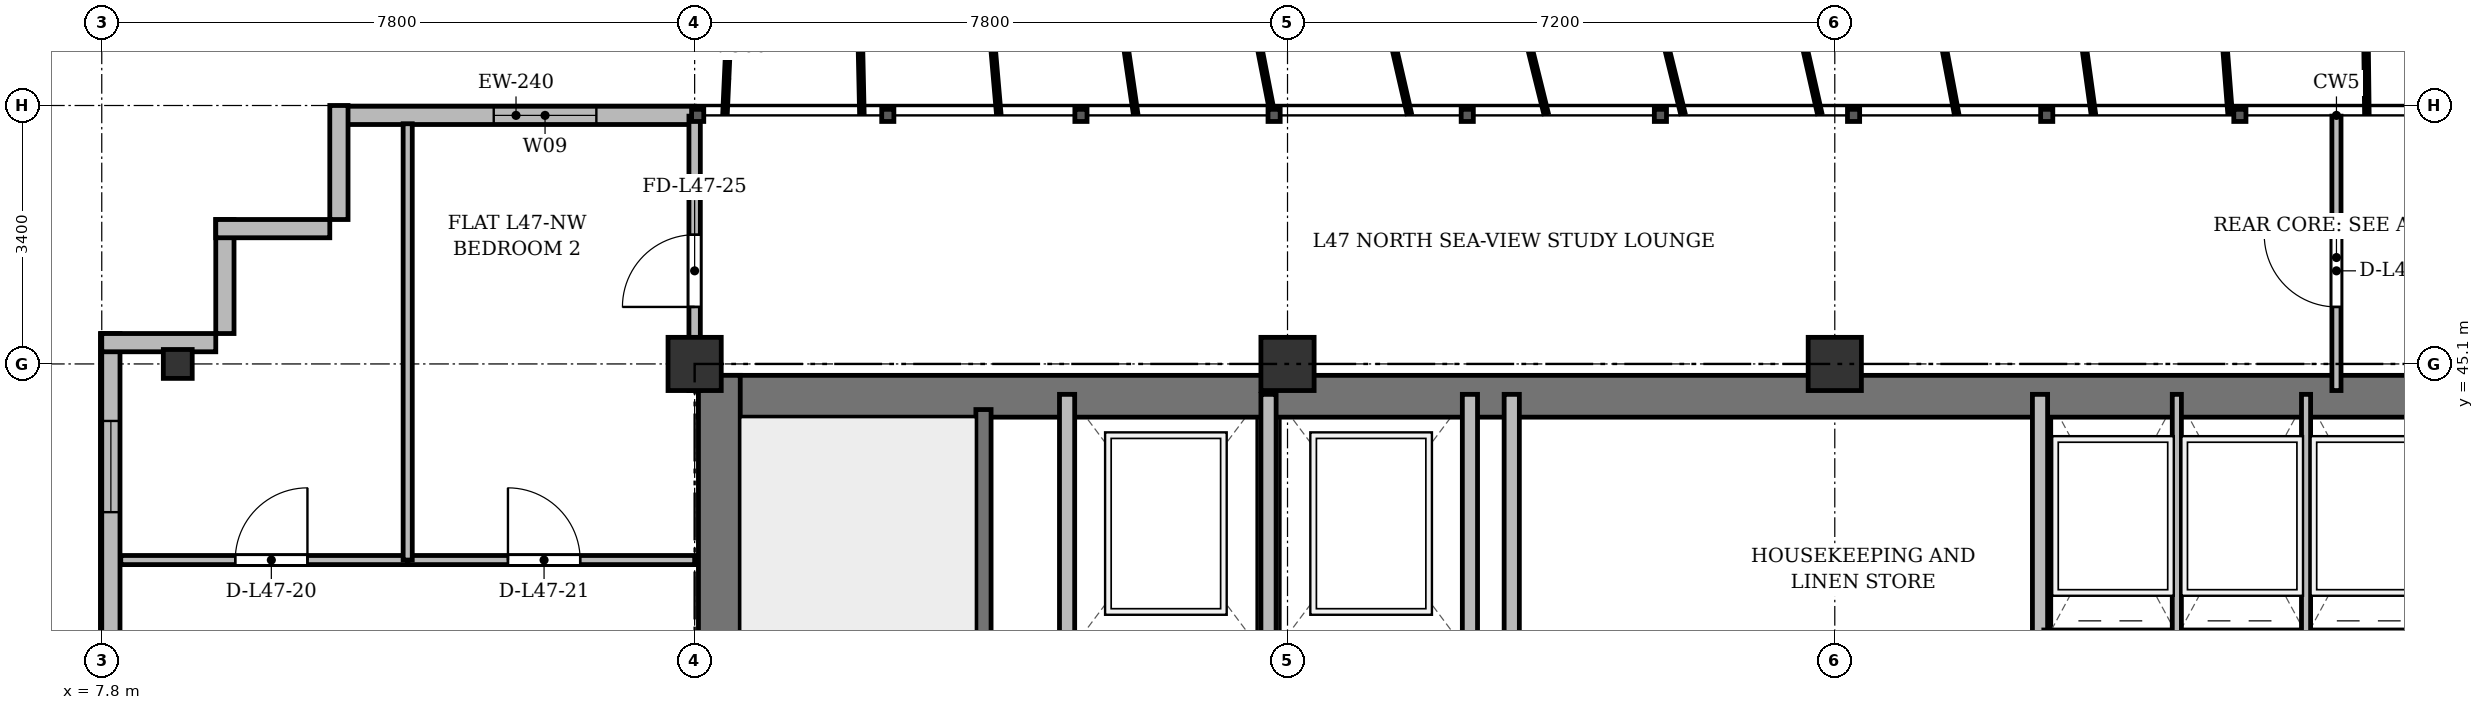
"""IFC4 building model, lengths in metres.
Left out: names, types, materials, properties, quantities, classifications, styles, units other than length and angle.
Written with IfcOpenShell. Run it as: python <this file> out.ifc"""

import sys

from ifc_helpers import new_model, si_unit, direction, frame, frame_2d, origin, origin_2d, place, context, subcontext, project, spatial, rectangle, i_section, extrude, source, transform, mapped, element, fill, save


model = new_model("IFC4")
c1 = context("Model", 3, precision=1e-05, world=origin(), true_north=direction((0.0, 1.0)))
c2 = subcontext(c1, "Body", "Model", "MODEL_VIEW")
j1 = project(units=[si_unit("LENGTHUNIT", "METRE"), si_unit("PLANEANGLEUNIT", "RADIAN")], contexts=[c1])
p1 = place(None, origin())
s1 = spatial("IfcSite", under=j1, at=p1, CompositionType="ELEMENT")
p2 = place(p1, origin())
s2 = spatial("IfcBuilding", under=s1, at=p2, CompositionType="ELEMENT")
p3 = place(p2, frame((0.0, 0.0, 178.9)))
s3 = spatial("IfcBuildingStorey", under=s2, at=p3, CompositionType="ELEMENT", Elevation=178.9)
m1 = source(origin(), c2, "Body", "SweptSolid", [
    extrude(i_section(OverallWidth=0.38, OverallDepth=0.38, WebThickness=0.02, FlangeThickness=0.03, at=origin_2d()), origin(), (0.0, 0.0, 1.0), 3.6),
])
p4 = place(p3, frame((8.8, 45.1, 0.0), z_axis=(0.0, 0.0, 1.0), x_axis=(1.0, 0.0, 0.0)))
e1 = element("IfcColumn", 1, at=p4, inside=s3, PredefinedType="COLUMN", context=c2, shape_type="MappedRepresentation", body=[
    mapped(m1, transform((0.0, 0.0, 0.0), x_axis=(1.0, 0.0, 0.0), y_axis=(0.0, 1.0, 0.0), z_axis=(0.0, 0.0, 1.0), scale=1.0)),
])
m2 = source(origin(), c2, "Body", "SweptSolid", [
    extrude(rectangle(XDim=0.7, YDim=0.7, at=origin_2d()), origin(), (0.0, 0.0, 1.0), 3.6),
])
for number, where, z_axis, x_axis in (
    (2, (15.6, 45.1, 0.0), (0.0, 0.0, 1.0), (1.0, 0.0, 0.0)),
    (3, (23.4, 45.1, 0.0), (0.0, 0.0, 1.0), (1.0, 0.0, 0.0)),
    (4, (30.6, 45.1, 0.0), (0.0, 0.0, 1.0), (1.0, 0.0, 0.0)),
):
    element("IfcColumn", number, at=place(p3, frame(where, z_axis=z_axis, x_axis=x_axis)), inside=s3, PredefinedType="COLUMN", context=c2, shape_type="MappedRepresentation", body=[
        mapped(m2, transform((0.0, 0.0, 0.0), x_axis=(1.0, 0.0, 0.0), y_axis=(0.0, 1.0, 0.0), z_axis=(0.0, 0.0, 1.0), scale=1.0)),
    ])
p5 = place(p3, frame((10.9, 48.37, 0.0), z_axis=(0.0, 0.0, 1.0), x_axis=(1.0, 0.0, 0.0)))
e5 = element("IfcWall", 5, at=p5, inside=s3, PredefinedType="SOLIDWALL", context=c2, shape_type="SweptSolid", body=[
    extrude(rectangle(XDim=4.7, YDim=0.24, at=frame_2d((2.35, 0.0))), origin(), (0.0, 0.0, 1.0), 3.22),
])
p6 = place(p5, frame((2.057, 0.0, 0.9)))
e6 = element("IfcOpeningElement", 6, at=p6, cuts=e5, PredefinedType="OPENING", context=c2, shape_type="SweptSolid", body=[
    extrude(rectangle(XDim=1.35, YDim=1.5, at=frame_2d((0.675, 0.75))), frame((0.0, 0.13, 0.0), z_axis=(0.0, -1.0, 0.0), x_axis=(1.0, 0.0, 0.0)), (0.0, 0.0, 1.0), 0.26),
])
p7 = place(p3, frame((7.92, 6.3, 0.0), z_axis=(0.0, 0.0, 1.0), x_axis=(0.0, 1.0, 0.0)))
e7 = element("IfcWall", 7, at=p7, inside=s3, PredefinedType="SOLIDWALL", context=c2, shape_type="SweptSolid", body=[
    extrude(rectangle(XDim=39.2, YDim=0.24, at=frame_2d((19.6, 0.0))), origin(), (0.0, 0.0, 1.0), 3.22),
])
p8 = place(p7, frame((1.45, 0.0, 0.92)))
e8 = element("IfcOpeningElement", 8, at=p8, cuts=e7, PredefinedType="OPENING", context=c2, shape_type="SweptSolid", body=[
    extrude(rectangle(XDim=1.2, YDim=1.65, at=frame_2d((0.6, 0.825))), frame((0.0, 0.13, 0.0), z_axis=(0.0, -1.0, 0.0), x_axis=(1.0, 0.0, 0.0)), (0.0, 0.0, 1.0), 0.26),
])
p9 = place(p7, frame((3.9, 0.0, 0.92)))
e9 = element("IfcOpeningElement", 9, at=p9, cuts=e7, PredefinedType="OPENING", context=c2, shape_type="SweptSolid", body=[
    extrude(rectangle(XDim=2.4, YDim=2.1, at=frame_2d((1.2, 1.05))), frame((0.0, 0.13, 0.0), z_axis=(0.0, -1.0, 0.0), x_axis=(1.0, 0.0, 0.0)), (0.0, 0.0, 1.0), 0.26),
])
p10 = place(p7, frame((8.1, 0.0, 0.92)))
e10 = element("IfcOpeningElement", 10, at=p10, cuts=e7, PredefinedType="OPENING", context=c2, shape_type="SweptSolid", body=[
    extrude(rectangle(XDim=2.4, YDim=2.1, at=frame_2d((1.2, 1.05))), frame((0.0, 0.13, 0.0), z_axis=(0.0, -1.0, 0.0), x_axis=(1.0, 0.0, 0.0)), (0.0, 0.0, 1.0), 0.26),
])
p11 = place(p7, frame((15.3, 0.0, 0.92)))
e11 = element("IfcOpeningElement", 11, at=p11, cuts=e7, PredefinedType="OPENING", context=c2, shape_type="SweptSolid", body=[
    extrude(rectangle(XDim=2.4, YDim=2.1, at=frame_2d((1.2, 1.05))), frame((0.0, 0.13, 0.0), z_axis=(0.0, -1.0, 0.0), x_axis=(1.0, 0.0, 0.0)), (0.0, 0.0, 1.0), 0.26),
])
p12 = place(p7, frame((33.5, 0.0, 0.92)))
e12 = element("IfcOpeningElement", 12, at=p12, cuts=e7, PredefinedType="OPENING", context=c2, shape_type="SweptSolid", body=[
    extrude(rectangle(XDim=1.2, YDim=1.65, at=frame_2d((0.6, 0.825))), frame((0.0, 0.13, 0.0), z_axis=(0.0, -1.0, 0.0), x_axis=(1.0, 0.0, 0.0)), (0.0, 0.0, 1.0), 0.26),
])
p13 = place(p7, frame((36.85, 0.0, 0.92)))
e13 = element("IfcOpeningElement", 13, at=p13, cuts=e7, PredefinedType="OPENING", context=c2, shape_type="SweptSolid", body=[
    extrude(rectangle(XDim=1.2, YDim=1.65, at=frame_2d((0.6, 0.825))), frame((0.0, 0.13, 0.0), z_axis=(0.0, -1.0, 0.0), x_axis=(1.0, 0.0, 0.0)), (0.0, 0.0, 1.0), 0.26),
])
for number, where, z_axis, x_axis in (
    (14, (7.8, 45.38, 0.0), (0.0, 0.0, 1.0), (1.0, 0.0, 0.0)),
    (15, (9.42, 45.5, 0.0), (0.0, 0.0, 1.0), (0.0, 1.0, 0.0)),
    (16, (9.3, 46.88, 0.0), (0.0, 0.0, 1.0), (1.0, 0.0, 0.0)),
    (17, (10.92, 47.0, 0.0), (0.0, 0.0, 1.0), (0.0, 1.0, 0.0)),
):
    element("IfcWall", number, at=place(p3, frame(where, z_axis=z_axis, x_axis=x_axis)), inside=s3, PredefinedType="SOLIDWALL", context=c2, shape_type="SweptSolid", body=[
        extrude(rectangle(XDim=1.5, YDim=0.24, at=frame_2d((0.75, 0.0))), origin(), (0.0, 0.0, 1.0), 3.22),
    ])
p14 = place(p3, frame((15.65, 44.675, 0.0), z_axis=(0.0, 0.0, 1.0), x_axis=(1.0, 0.0, 0.0)))
e18 = element("IfcWall", 18, at=p14, inside=s3, PredefinedType="SHEAR", context=c2, shape_type="SweptSolid", body=[
    extrude(rectangle(XDim=43.1, YDim=0.55, at=frame_2d((21.55, 0.0))), origin(), (0.0, 0.0, 1.0), 3.22),
])
p15 = place(p3, frame((15.925, 33.4, 0.0), z_axis=(0.0, 0.0, 1.0), x_axis=(0.0, 1.0, 0.0)))
e19 = element("IfcWall", 19, at=p15, inside=s3, PredefinedType="SHEAR", context=c2, shape_type="SweptSolid", body=[
    extrude(rectangle(XDim=11.55, YDim=0.55, at=frame_2d((5.775, 0.0))), origin(), (0.0, 0.0, 1.0), 3.22),
])
p16 = place(p3, frame((19.4, 33.4, 0.0), z_axis=(0.0, 0.0, 1.0), x_axis=(0.0, 1.0, 0.0)))
e20 = element("IfcWall", 20, at=p16, inside=s3, PredefinedType="SHEAR", context=c2, shape_type="SweptSolid", body=[
    extrude(rectangle(XDim=11.1, YDim=0.2, at=frame_2d((5.55, 0.0))), origin(), (0.0, 0.0, 1.0), 3.22),
])
p17 = place(p16, frame((0.85, 0.0, 0.0)))
e21 = element("IfcOpeningElement", 21, at=p17, cuts=e20, PredefinedType="OPENING", context=c2, shape_type="SweptSolid", body=[
    extrude(rectangle(XDim=1.1, YDim=2.15, at=frame_2d((0.55, 1.075))), frame((0.0, 0.11, 0.0), z_axis=(0.0, -1.0, 0.0), x_axis=(1.0, 0.0, 0.0)), (0.0, 0.0, 1.0), 0.22),
])
for number, where, z_axis, x_axis in (
    (22, (20.5, 41.3, 0.0), (0.0, 0.0, 1.0), (0.0, 1.0, 0.0)),
    (23, (23.15, 41.3, 0.0), (0.0, 0.0, 1.0), (0.0, 1.0, 0.0)),
    (24, (25.8, 41.3, 0.0), (0.0, 0.0, 1.0), (0.0, 1.0, 0.0)),
):
    element("IfcWall", number, at=place(p3, frame(where, z_axis=z_axis, x_axis=x_axis)), inside=s3, PredefinedType="SOLIDWALL", context=c2, shape_type="SweptSolid", body=[
        extrude(rectangle(XDim=3.4, YDim=0.2, at=frame_2d((1.7, 0.0))), origin(), (0.0, 0.0, 1.0), 3.22),
    ])
for number, where, z_axis, x_axis in (
    (25, (26.35, 33.4, 0.0), (0.0, 0.0, 1.0), (0.0, 1.0, 0.0)),
    (26, (33.3, 33.4, 0.0), (0.0, 0.0, 1.0), (0.0, 1.0, 0.0)),
):
    element("IfcWall", number, at=place(p3, frame(where, z_axis=z_axis, x_axis=x_axis)), inside=s3, PredefinedType="SOLIDWALL", context=c2, shape_type="SweptSolid", body=[
        extrude(rectangle(XDim=11.3, YDim=0.2, at=frame_2d((5.65, 0.0))), origin(), (0.0, 0.0, 1.0), 2.62),
    ])
for number, where, z_axis, x_axis in (
    (27, (35.1, 41.5, 0.0), (0.0, 0.0, 1.0), (0.0, 1.0, 0.0)),
    (28, (36.8, 41.5, 0.0), (0.0, 0.0, 1.0), (0.0, 1.0, 0.0)),
):
    element("IfcWall", number, at=place(p3, frame(where, z_axis=z_axis, x_axis=x_axis)), inside=s3, PredefinedType="PARTITIONING", context=c2, shape_type="SweptSolid", body=[
        extrude(rectangle(XDim=3.2, YDim=0.12, at=frame_2d((1.6, 0.0))), origin(), (0.0, 0.0, 1.0), 3.22),
    ])
p18 = place(p3, frame((8.05, 42.52, 0.0), z_axis=(0.0, 0.0, 1.0), x_axis=(1.0, 0.0, 0.0)))
e29 = element("IfcWall", 29, at=p18, inside=s3, PredefinedType="PARTITIONING", context=c2, shape_type="SweptSolid", body=[
    extrude(rectangle(XDim=3.775, YDim=0.12, at=frame_2d((1.887, 0.0))), origin(), (0.0, 0.0, 1.0), 2.72),
])
p19 = place(p18, frame((1.506, 0.0, 0.0)))
e30 = element("IfcOpeningElement", 30, at=p19, cuts=e29, PredefinedType="OPENING", context=c2, shape_type="SweptSolid", body=[
    extrude(rectangle(XDim=0.95, YDim=2.15, at=frame_2d((0.475, 1.075))), frame((0.0, 0.07, 0.0), z_axis=(0.0, -1.0, 0.0), x_axis=(1.0, 0.0, 0.0)), (0.0, 0.0, 1.0), 0.14),
])
p20 = place(p3, frame((11.825, 42.52, 0.0), z_axis=(0.0, 0.0, 1.0), x_axis=(1.0, 0.0, 0.0)))
e31 = element("IfcWall", 31, at=p20, inside=s3, PredefinedType="PARTITIONING", context=c2, shape_type="SweptSolid", body=[
    extrude(rectangle(XDim=3.775, YDim=0.12, at=frame_2d((1.888, 0.0))), origin(), (0.0, 0.0, 1.0), 2.72),
])
p21 = place(p20, frame((1.319, 0.0, 0.0)))
e32 = element("IfcOpeningElement", 32, at=p21, cuts=e31, PredefinedType="OPENING", context=c2, shape_type="SweptSolid", body=[
    extrude(rectangle(XDim=0.95, YDim=2.15, at=frame_2d((0.475, 1.075))), frame((0.0, 0.07, 0.0), z_axis=(0.0, -1.0, 0.0), x_axis=(1.0, 0.0, 0.0)), (0.0, 0.0, 1.0), 0.14),
])
p22 = place(p3, frame((11.825, 42.52, 0.0), z_axis=(0.0, 0.0, 1.0), x_axis=(0.0, 1.0, 0.0)))
e33 = element("IfcWall", 33, at=p22, inside=s3, PredefinedType="PARTITIONING", context=c2, shape_type="SweptSolid", body=[
    extrude(rectangle(XDim=5.74, YDim=0.12, at=frame_2d((2.87, 0.0))), origin(), (0.0, 0.0, 1.0), 2.62),
])
p23 = place(p3, frame((37.2, 44.75, 0.0), z_axis=(0.0, 0.0, 1.0), x_axis=(0.0, 1.0, 0.0)))
e34 = element("IfcWall", 34, at=p23, inside=s3, PredefinedType="PARTITIONING", context=c2, shape_type="SweptSolid", body=[
    extrude(rectangle(XDim=3.61, YDim=0.12, at=frame_2d((1.805, 0.0))), origin(), (0.0, 0.0, 1.0), 2.62),
])
p24 = place(p23, frame((1.1, 0.0, 0.0)))
e35 = element("IfcOpeningElement", 35, at=p24, cuts=e34, PredefinedType="OPENING", context=c2, shape_type="SweptSolid", body=[
    extrude(rectangle(XDim=0.95, YDim=2.15, at=frame_2d((0.475, 1.075))), frame((0.0, 0.07, 0.0), z_axis=(0.0, -1.0, 0.0), x_axis=(1.0, 0.0, 0.0)), (0.0, 0.0, 1.0), 0.14),
])
p25 = place(p3, frame((15.6, 44.75, 0.0), z_axis=(0.0, 0.0, 1.0), x_axis=(0.0, 1.0, 0.0)))
e36 = element("IfcWall", 36, at=p25, inside=s3, PredefinedType="PARTITIONING", context=c2, shape_type="SweptSolid", body=[
    extrude(rectangle(XDim=3.61, YDim=0.15, at=frame_2d((1.805, 0.0))), origin(), (0.0, 0.0, 1.0), 2.72),
])
p26 = place(p25, frame((1.1, 0.0, 0.0)))
e37 = element("IfcOpeningElement", 37, at=p26, cuts=e36, PredefinedType="OPENING", context=c2, shape_type="SweptSolid", body=[
    extrude(rectangle(XDim=0.95, YDim=2.15, at=frame_2d((0.475, 1.075))), frame((0.0, 0.085, 0.0), z_axis=(0.0, -1.0, 0.0), x_axis=(1.0, 0.0, 0.0)), (0.0, 0.0, 1.0), 0.17),
])
m3 = source(origin(), c2, "Body", "SweptSolid", [
    extrude(rectangle(XDim=1.35, YDim=1.5, at=frame_2d((0.675, 0.75))), frame((0.0, 0.03, 0.0), z_axis=(0.0, -1.0, 0.0), x_axis=(1.0, 0.0, 0.0)), (0.0, 0.0, 1.0), 0.06),
])
p27 = place(p6, origin())
e38 = element("IfcWindow", 38, at=p27, inside=s3, PartitioningType="SINGLE_PANEL", PredefinedType="WINDOW", context=c2, shape_type="MappedRepresentation", body=[
    mapped(m3, transform((0.0, 0.0, 0.0), x_axis=(1.0, 0.0, 0.0), y_axis=(0.0, 1.0, 0.0), z_axis=(0.0, 0.0, 1.0), scale=1.0)),
])
fill(e6, e38)
m4 = source(origin(), c2, "Body", "SweptSolid", [
    extrude(rectangle(XDim=1.2, YDim=1.65, at=frame_2d((0.6, 0.825))), frame((0.0, 0.03, 0.0), z_axis=(0.0, -1.0, 0.0), x_axis=(1.0, 0.0, 0.0)), (0.0, 0.0, 1.0), 0.06),
])
p28 = place(p13, origin())
e39 = element("IfcWindow", 39, at=p28, inside=s3, PartitioningType="SINGLE_PANEL", PredefinedType="WINDOW", context=c2, shape_type="MappedRepresentation", body=[
    mapped(m4, transform((0.0, 0.0, 0.0), x_axis=(1.0, 0.0, 0.0), y_axis=(0.0, 1.0, 0.0), z_axis=(0.0, 0.0, 1.0), scale=1.0)),
])
fill(e13, e39)
m5 = source(origin(), c2, "Body", "SweptSolid", [
    extrude(rectangle(XDim=0.95, YDim=2.15, at=frame_2d((0.475, 1.075))), frame((0.0, 0.025, 0.0), z_axis=(0.0, -1.0, 0.0), x_axis=(1.0, 0.0, 0.0)), (0.0, 0.0, 1.0), 0.05),
])
p29 = place(p19, origin())
e40 = element("IfcDoor", 40, at=p29, inside=s3, OperationType="SINGLE_SWING_RIGHT", PredefinedType="DOOR", context=c2, shape_type="MappedRepresentation", body=[
    mapped(m5, transform((0.0, 0.0, 0.0), x_axis=(1.0, 0.0, 0.0), y_axis=(0.0, 1.0, 0.0), z_axis=(0.0, 0.0, 1.0), scale=1.0)),
])
fill(e30, e40)
p30 = place(p21, origin())
e41 = element("IfcDoor", 41, at=p30, inside=s3, OperationType="SINGLE_SWING_LEFT", PredefinedType="DOOR", context=c2, shape_type="MappedRepresentation", body=[
    mapped(m5, transform((0.0, 0.0, 0.0), x_axis=(1.0, 0.0, 0.0), y_axis=(0.0, 1.0, 0.0), z_axis=(0.0, 0.0, 1.0), scale=1.0)),
])
fill(e32, e41)
p31 = place(p24, origin())
e42 = element("IfcDoor", 42, at=p31, inside=s3, OperationType="SINGLE_SWING_RIGHT", PredefinedType="DOOR", context=c2, shape_type="MappedRepresentation", body=[
    mapped(m5, transform((0.0, 0.0, 0.0), x_axis=(1.0, 0.0, 0.0), y_axis=(0.0, 1.0, 0.0), z_axis=(0.0, 0.0, 1.0), scale=1.0)),
])
fill(e35, e42)
p32 = place(p26, origin())
e43 = element("IfcDoor", 43, at=p32, inside=s3, OperationType="SINGLE_SWING_LEFT", PredefinedType="DOOR", context=c2, shape_type="MappedRepresentation", body=[
    mapped(m5, transform((0.0, 0.0, 0.0), x_axis=(1.0, 0.0, 0.0), y_axis=(0.0, 1.0, 0.0), z_axis=(0.0, 0.0, 1.0), scale=1.0)),
])
fill(e37, e43)
save(model, sys.argv[1])
